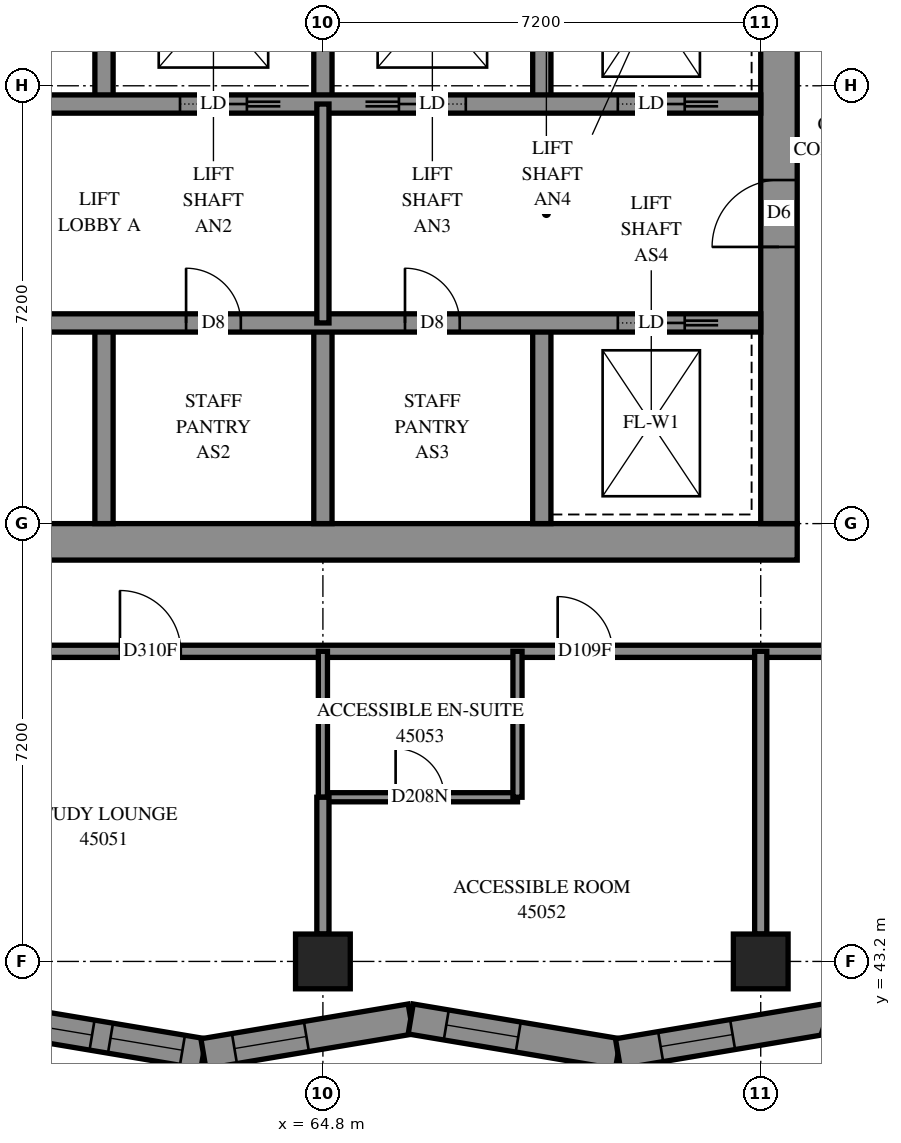
"""IFC4 building model, lengths in metres.
Left out: names, types, materials, properties, quantities, classifications, styles, units other than length and angle.
Written with IfcOpenShell. Run it as: python <this file> out.ifc"""

import sys

from ifc_helpers import new_model, si_unit, direction, frame, frame_2d, origin, origin_2d, place, context, subcontext, project, spatial, polyline, rectangle, outline, extrude, element, fill, save


model = new_model("IFC4")
c1 = context("Model", 3, precision=1e-05, world=origin(), true_north=direction((0.0, 1.0)))
c2 = subcontext(c1, "Body", "Model", "MODEL_VIEW")
j1 = project(units=[si_unit("LENGTHUNIT", "METRE"), si_unit("PLANEANGLEUNIT", "RADIAN")], contexts=[c1])
p1 = place(None, origin())
s1 = spatial("IfcSite", under=j1, at=p1, CompositionType="ELEMENT")
p2 = place(p1, origin())
s2 = spatial("IfcBuilding", under=s1, at=p2, CompositionType="ELEMENT")
p3 = place(p2, frame((0.0, 0.0, 166.0)))
s3 = spatial("IfcBuildingStorey", under=s2, at=p3, CompositionType="ELEMENT", Elevation=166.0)
for number, where, z_axis, x_axis in (
    (1, (64.8, 43.2, 0.0), (0.0, 0.0, 1.0), (1.0, 0.0, 0.0)),
    (2, (72.0, 43.2, 0.0), (0.0, 0.0, 1.0), (1.0, 0.0, 0.0)),
):
    element("IfcColumn", number, at=place(p3, frame(where, z_axis=z_axis, x_axis=x_axis)), inside=s3, PredefinedType="COLUMN", context=c2, shape_type="SweptSolid", body=[
        extrude(rectangle(XDim=0.9, YDim=0.9, at=origin_2d()), origin(), (0.0, 0.0, 1.0), 3.1),
    ])
p4 = place(p3, frame((57.0, 50.1, -0.3), z_axis=(0.0, 0.0, 1.0), x_axis=(1.0, 0.0, 0.0)))
e3 = element("IfcWall", 3, at=p4, inside=s3, PredefinedType="SHEAR", context=c2, shape_type="SweptSolid", body=[
    extrude(rectangle(XDim=15.6, YDim=0.6, at=frame_2d((7.8, 0.0))), origin(), (0.0, 0.0, 1.0), 2.7),
])
p5 = place(p3, frame((72.3, 50.4, -0.3), z_axis=(0.0, 0.0, 1.0), x_axis=(0.0, 1.0, 0.0)))
e4 = element("IfcWall", 4, at=p5, inside=s3, PredefinedType="SHEAR", context=c2, shape_type="SweptSolid", body=[
    extrude(rectangle(XDim=14.4, YDim=0.6, at=frame_2d((7.2, 0.0))), origin(), (0.0, 0.0, 1.0), 2.7),
])
p6 = place(p5, frame((4.55, 0.0, 0.3)))
e5 = element("IfcOpeningElement", 5, at=p6, cuts=e4, PredefinedType="OPENING", context=c2, shape_type="SweptSolid", body=[
    extrude(rectangle(XDim=1.1, YDim=2.1, at=frame_2d((0.55, 1.05))), frame((0.0, 0.31, 0.0), z_axis=(0.0, -1.0, 0.0), x_axis=(1.0, 0.0, 0.0)), (0.0, 0.0, 1.0), 0.62),
])
p7 = place(p5, frame((11.35, 0.0, 0.3)))
e6 = element("IfcOpeningElement", 6, at=p7, cuts=e4, PredefinedType="OPENING", context=c2, shape_type="SweptSolid", body=[
    extrude(rectangle(XDim=1.1, YDim=2.1, at=frame_2d((0.55, 1.05))), frame((0.0, 0.31, 0.0), z_axis=(0.0, -1.0, 0.0), x_axis=(1.0, 0.0, 0.0)), (0.0, 0.0, 1.0), 0.62),
])
for number, where, z_axis, x_axis in (
    (7, (61.2, 50.4, 0.0), (0.0, 0.0, 1.0), (0.0, 1.0, 0.0)),
    (8, (61.2, 57.3, 0.0), (0.0, 0.0, 1.0), (0.0, 1.0, 0.0)),
    (9, (64.8, 50.4, 0.0), (0.0, 0.0, 1.0), (0.0, 1.0, 0.0)),
    (10, (64.8, 57.3, 0.0), (0.0, 0.0, 1.0), (0.0, 1.0, 0.0)),
    (11, (68.4, 50.4, 0.0), (0.0, 0.0, 1.0), (0.0, 1.0, 0.0)),
    (12, (68.4, 57.3, 0.0), (0.0, 0.0, 1.0), (0.0, 1.0, 0.0)),
):
    element("IfcWall", number, at=place(p3, frame(where, z_axis=z_axis, x_axis=x_axis)), inside=s3, PredefinedType="SOLIDWALL", context=c2, shape_type="SweptSolid", body=[
        extrude(rectangle(XDim=3.3, YDim=0.3, at=frame_2d((1.65, 0.0))), origin(), (0.0, 0.0, 1.0), 3.1),
    ])
p8 = place(p3, frame((57.6, 53.7, 0.0), z_axis=(0.0, 0.0, 1.0), x_axis=(1.0, 0.0, 0.0)))
e13 = element("IfcWall", 13, at=p8, inside=s3, PredefinedType="SOLIDWALL", context=c2, shape_type="SweptSolid", body=[
    extrude(rectangle(XDim=14.4, YDim=0.3, at=frame_2d((7.2, 0.0))), origin(), (0.0, 0.0, 1.0), 3.1),
])
p9 = place(p8, frame((1.35, 0.0, 0.0)))
e14 = element("IfcOpeningElement", 14, at=p9, cuts=e13, PredefinedType="OPENING", context=c2, shape_type="SweptSolid", body=[
    extrude(rectangle(XDim=0.9, YDim=2.1, at=frame_2d((0.45, 1.05))), frame((0.0, 0.16, 0.0), z_axis=(0.0, -1.0, 0.0), x_axis=(1.0, 0.0, 0.0)), (0.0, 0.0, 1.0), 0.32),
])
p10 = place(p8, frame((4.95, 0.0, 0.0)))
e15 = element("IfcOpeningElement", 15, at=p10, cuts=e13, PredefinedType="OPENING", context=c2, shape_type="SweptSolid", body=[
    extrude(rectangle(XDim=0.9, YDim=2.1, at=frame_2d((0.45, 1.05))), frame((0.0, 0.16, 0.0), z_axis=(0.0, -1.0, 0.0), x_axis=(1.0, 0.0, 0.0)), (0.0, 0.0, 1.0), 0.32),
])
p11 = place(p8, frame((8.55, 0.0, 0.0)))
e16 = element("IfcOpeningElement", 16, at=p11, cuts=e13, PredefinedType="OPENING", context=c2, shape_type="SweptSolid", body=[
    extrude(rectangle(XDim=0.9, YDim=2.1, at=frame_2d((0.45, 1.05))), frame((0.0, 0.16, 0.0), z_axis=(0.0, -1.0, 0.0), x_axis=(1.0, 0.0, 0.0)), (0.0, 0.0, 1.0), 0.32),
])
p12 = place(p8, frame((12.05, 0.0, 0.0)))
e17 = element("IfcOpeningElement", 17, at=p12, cuts=e13, PredefinedType="OPENING", context=c2, shape_type="SweptSolid", body=[
    extrude(rectangle(XDim=1.1, YDim=2.1, at=frame_2d((0.55, 1.05))), frame((0.0, 0.16, 0.0), z_axis=(0.0, -1.0, 0.0), x_axis=(1.0, 0.0, 0.0)), (0.0, 0.0, 1.0), 0.32),
])
p13 = place(p3, frame((57.6, 57.3, 0.0), z_axis=(0.0, 0.0, 1.0), x_axis=(1.0, 0.0, 0.0)))
e18 = element("IfcWall", 18, at=p13, inside=s3, PredefinedType="SOLIDWALL", context=c2, shape_type="SweptSolid", body=[
    extrude(rectangle(XDim=14.4, YDim=0.3, at=frame_2d((7.2, 0.0))), origin(), (0.0, 0.0, 1.0), 3.1),
])
p14 = place(p13, frame((1.25, 0.0, 0.0)))
e19 = element("IfcOpeningElement", 19, at=p14, cuts=e18, PredefinedType="OPENING", context=c2, shape_type="SweptSolid", body=[
    extrude(rectangle(XDim=1.1, YDim=2.1, at=frame_2d((0.55, 1.05))), frame((0.0, 0.16, 0.0), z_axis=(0.0, -1.0, 0.0), x_axis=(1.0, 0.0, 0.0)), (0.0, 0.0, 1.0), 0.32),
])
p15 = place(p13, frame((4.85, 0.0, 0.0)))
e20 = element("IfcOpeningElement", 20, at=p15, cuts=e18, PredefinedType="OPENING", context=c2, shape_type="SweptSolid", body=[
    extrude(rectangle(XDim=1.1, YDim=2.1, at=frame_2d((0.55, 1.05))), frame((0.0, 0.16, 0.0), z_axis=(0.0, -1.0, 0.0), x_axis=(1.0, 0.0, 0.0)), (0.0, 0.0, 1.0), 0.32),
])
p16 = place(p13, frame((8.45, 0.0, 0.0)))
e21 = element("IfcOpeningElement", 21, at=p16, cuts=e18, PredefinedType="OPENING", context=c2, shape_type="SweptSolid", body=[
    extrude(rectangle(XDim=1.1, YDim=2.1, at=frame_2d((0.55, 1.05))), frame((0.0, 0.16, 0.0), z_axis=(0.0, -1.0, 0.0), x_axis=(1.0, 0.0, 0.0)), (0.0, 0.0, 1.0), 0.32),
])
p17 = place(p13, frame((12.05, 0.0, 0.0)))
e22 = element("IfcOpeningElement", 22, at=p17, cuts=e18, PredefinedType="OPENING", context=c2, shape_type="SweptSolid", body=[
    extrude(rectangle(XDim=1.1, YDim=2.1, at=frame_2d((0.55, 1.05))), frame((0.0, 0.16, 0.0), z_axis=(0.0, -1.0, 0.0), x_axis=(1.0, 0.0, 0.0)), (0.0, 0.0, 1.0), 0.32),
])
p18 = place(p3, frame((59.426, 42.254, 0.0), z_axis=(0.0, 0.0, 1.0), x_axis=(0.9862119159, -0.1654873316, 0.0)))
e23 = element("IfcWall", 23, at=p18, inside=s3, PredefinedType="SOLIDWALL", context=c2, shape_type="SweptSolid", body=[
    extrude(outline(polyline([(0.042, -0.25), (3.498, -0.25), (3.414, 0.25), (-0.042, 0.25), (0.042, -0.25)])), origin(), (0.0, 0.0, 1.0), 3.1),
])
p19 = place(p18, frame((0.399, 0.0, 0.45)))
e24 = element("IfcOpeningElement", 24, at=p19, cuts=e23, PredefinedType="OPENING", context=c2, shape_type="SweptSolid", body=[
    extrude(rectangle(XDim=1.2, YDim=2.5, at=frame_2d((0.6, 1.25))), frame((0.0, 0.26, 0.0), z_axis=(0.0, -1.0, 0.0), x_axis=(1.0, 0.0, 0.0)), (0.0, 0.0, 1.0), 0.52),
])
p20 = place(p18, frame((1.906, 0.0, 0.45)))
e25 = element("IfcOpeningElement", 25, at=p20, cuts=e23, PredefinedType="OPENING", context=c2, shape_type="SweptSolid", body=[
    extrude(rectangle(XDim=1.2, YDim=2.5, at=frame_2d((0.6, 1.25))), frame((0.0, 0.26, 0.0), z_axis=(0.0, -1.0, 0.0), x_axis=(1.0, 0.0, 0.0)), (0.0, 0.0, 1.0), 0.52),
])
p21 = place(p3, frame((62.835, 41.681, 0.0), z_axis=(0.0, 0.0, 1.0), x_axis=(0.9862119159, 0.1654873316, 0.0)))
e26 = element("IfcWall", 26, at=p21, inside=s3, PredefinedType="SOLIDWALL", context=c2, shape_type="SweptSolid", body=[
    extrude(outline(polyline([(-0.042, -0.25), (3.414, -0.25), (3.498, 0.25), (0.042, 0.25), (-0.042, -0.25)])), origin(), (0.0, 0.0, 1.0), 3.1),
])
p22 = place(p21, frame((0.517, 0.0, 0.45)))
e27 = element("IfcOpeningElement", 27, at=p22, cuts=e26, PredefinedType="OPENING", context=c2, shape_type="SweptSolid", body=[
    extrude(rectangle(XDim=1.2, YDim=2.5, at=frame_2d((0.6, 1.25))), frame((0.0, 0.26, 0.0), z_axis=(0.0, -1.0, 0.0), x_axis=(1.0, 0.0, 0.0)), (0.0, 0.0, 1.0), 0.52),
])
p23 = place(p3, frame((66.244, 42.254, 0.0), z_axis=(0.0, 0.0, 1.0), x_axis=(0.9862119159, -0.1654873316, 0.0)))
e28 = element("IfcWall", 28, at=p23, inside=s3, PredefinedType="SOLIDWALL", context=c2, shape_type="SweptSolid", body=[
    extrude(outline(polyline([(0.042, -0.25), (3.498, -0.25), (3.414, 0.25), (-0.042, 0.25), (0.042, -0.25)])), origin(), (0.0, 0.0, 1.0), 3.1),
])
p24 = place(p23, frame((0.593, 0.0, 0.45)))
e29 = element("IfcOpeningElement", 29, at=p24, cuts=e28, PredefinedType="OPENING", context=c2, shape_type="SweptSolid", body=[
    extrude(rectangle(XDim=1.2, YDim=2.5, at=frame_2d((0.6, 1.25))), frame((0.0, 0.26, 0.0), z_axis=(0.0, -1.0, 0.0), x_axis=(1.0, 0.0, 0.0)), (0.0, 0.0, 1.0), 0.52),
])
p25 = place(p3, frame((69.653, 41.681, 0.0), z_axis=(0.0, 0.0, 1.0), x_axis=(0.9862107034, 0.1654945573, 0.0)))
e30 = element("IfcWall", 30, at=p25, inside=s3, PredefinedType="SOLIDWALL", context=c2, shape_type="SweptSolid", body=[
    extrude(outline(polyline([(-0.042, -0.25), (3.414, -0.25), (3.542, 0.25), (0.042, 0.25), (-0.042, -0.25)])), origin(), (0.0, 0.0, 1.0), 3.1),
])
p26 = place(p25, frame((0.711, 0.0, 0.45)))
e31 = element("IfcOpeningElement", 31, at=p26, cuts=e30, PredefinedType="OPENING", context=c2, shape_type="SweptSolid", body=[
    extrude(rectangle(XDim=1.2, YDim=2.5, at=frame_2d((0.6, 1.25))), frame((0.0, 0.26, 0.0), z_axis=(0.0, -1.0, 0.0), x_axis=(1.0, 0.0, 0.0)), (0.0, 0.0, 1.0), 0.52),
])
p27 = place(p3, frame((64.8, 53.7, 0.0), z_axis=(0.0, 0.0, 1.0), x_axis=(0.0, 1.0, 0.0)))
e32 = element("IfcWall", 32, at=p27, inside=s3, PredefinedType="PARTITIONING", context=c2, shape_type="SweptSolid", body=[
    extrude(rectangle(XDim=3.6, YDim=0.2, at=frame_2d((1.8, 0.0))), origin(), (0.0, 0.0, 1.0), 3.1),
])
p28 = place(p3, frame((55.5, 48.3, 0.0), z_axis=(0.0, 0.0, 1.0), x_axis=(1.0, 0.0, 0.0)))
e33 = element("IfcWall", 33, at=p28, inside=s3, PredefinedType="PARTITIONING", context=c2, shape_type="SweptSolid", body=[
    extrude(rectangle(XDim=18.974, YDim=0.2, at=frame_2d((9.487, 0.0))), origin(), (0.0, 0.0, 1.0), 3.1),
])
p29 = place(p28, frame((5.963, 0.0, 0.0)))
e34 = element("IfcOpeningElement", 34, at=p29, cuts=e33, PredefinedType="OPENING", context=c2, shape_type="SweptSolid", body=[
    extrude(rectangle(XDim=1.0, YDim=2.1, at=frame_2d((0.5, 1.05))), frame((0.0, 0.11, 0.0), z_axis=(0.0, -1.0, 0.0), x_axis=(1.0, 0.0, 0.0)), (0.0, 0.0, 1.0), 0.22),
])
p30 = place(p28, frame((13.161, 0.0, 0.0)))
e35 = element("IfcOpeningElement", 35, at=p30, cuts=e33, PredefinedType="OPENING", context=c2, shape_type="SweptSolid", body=[
    extrude(rectangle(XDim=0.9, YDim=2.1, at=frame_2d((0.45, 1.05))), frame((0.0, 0.11, 0.0), z_axis=(0.0, -1.0, 0.0), x_axis=(1.0, 0.0, 0.0)), (0.0, 0.0, 1.0), 0.22),
])
p31 = place(p3, frame((72.0, 43.65, 0.0), z_axis=(0.0, 0.0, 1.0), x_axis=(0.0, 1.0, 0.0)))
e36 = element("IfcWall", 36, at=p31, inside=s3, PredefinedType="PARTITIONING", context=c2, shape_type="SweptSolid", body=[
    extrude(rectangle(XDim=4.65, YDim=0.2, at=frame_2d((2.325, 0.0))), origin(), (0.0, 0.0, 1.0), 3.1),
])
p32 = place(p3, frame((64.8, 45.9, 0.0), z_axis=(0.0, 0.0, 1.0), x_axis=(1.0, 0.0, 0.0)))
e37 = element("IfcWall", 37, at=p32, inside=s3, PredefinedType="PARTITIONING", context=c2, shape_type="SweptSolid", body=[
    extrude(rectangle(XDim=3.2, YDim=0.15, at=frame_2d((1.6, 0.0))), origin(), (0.0, 0.0, 1.0), 3.1),
])
p33 = place(p32, frame((1.196, 0.0, 0.0)))
e38 = element("IfcOpeningElement", 38, at=p33, cuts=e37, PredefinedType="OPENING", context=c2, shape_type="SweptSolid", body=[
    extrude(rectangle(XDim=0.8, YDim=2.1, at=frame_2d((0.4, 1.05))), frame((0.0, 0.085, 0.0), z_axis=(0.0, -1.0, 0.0), x_axis=(1.0, 0.0, 0.0)), (0.0, 0.0, 1.0), 0.17),
])
for number, where, z_axis, x_axis in (
    (39, (68.0, 45.9, 0.0), (0.0, 0.0, 1.0), (0.0, 1.0, 0.0)),
    (40, (64.8, 45.9, 0.0), (0.0, 0.0, 1.0), (0.0, 1.0, 0.0)),
):
    element("IfcWall", number, at=place(p3, frame(where, z_axis=z_axis, x_axis=x_axis)), inside=s3, PredefinedType="PARTITIONING", context=c2, shape_type="SweptSolid", body=[
        extrude(rectangle(XDim=2.4, YDim=0.15, at=frame_2d((1.2, 0.0))), origin(), (0.0, 0.0, 1.0), 3.1),
    ])
p34 = place(p3, frame((64.8, 43.65, 0.0), z_axis=(0.0, 0.0, 1.0), x_axis=(0.0, 1.0, 0.0)))
e41 = element("IfcWall", 41, at=p34, inside=s3, PredefinedType="PARTITIONING", context=c2, shape_type="SweptSolid", body=[
    extrude(rectangle(XDim=2.25, YDim=0.2, at=frame_2d((1.125, 0.0))), origin(), (0.0, 0.0, 1.0), 3.1),
])
p35 = place(p19, origin())
e42 = element("IfcWindow", 42, at=p35, inside=s3, PartitioningType="SINGLE_PANEL", PredefinedType="WINDOW", context=c2, shape_type="SweptSolid", body=[
    extrude(rectangle(XDim=1.2, YDim=2.5, at=frame_2d((0.6, 1.25))), frame((0.0, 0.18, 0.0), z_axis=(0.0, -1.0, 0.0), x_axis=(1.0, 0.0, 0.0)), (0.0, 0.0, 1.0), 0.06),
])
fill(e24, e42)
p36 = place(p20, origin())
e43 = element("IfcWindow", 43, at=p36, inside=s3, PartitioningType="SINGLE_PANEL", PredefinedType="WINDOW", context=c2, shape_type="SweptSolid", body=[
    extrude(rectangle(XDim=1.2, YDim=2.5, at=frame_2d((0.6, 1.25))), frame((0.0, 0.18, 0.0), z_axis=(0.0, -1.0, 0.0), x_axis=(1.0, 0.0, 0.0)), (0.0, 0.0, 1.0), 0.06),
])
fill(e25, e43)
p37 = place(p22, origin())
e44 = element("IfcWindow", 44, at=p37, inside=s3, PartitioningType="SINGLE_PANEL", PredefinedType="WINDOW", context=c2, shape_type="SweptSolid", body=[
    extrude(rectangle(XDim=1.2, YDim=2.5, at=frame_2d((0.6, 1.25))), frame((0.0, 0.18, 0.0), z_axis=(0.0, -1.0, 0.0), x_axis=(1.0, 0.0, 0.0)), (0.0, 0.0, 1.0), 0.06),
])
fill(e27, e44)
p38 = place(p24, origin())
e45 = element("IfcWindow", 45, at=p38, inside=s3, PartitioningType="SINGLE_PANEL", PredefinedType="WINDOW", context=c2, shape_type="SweptSolid", body=[
    extrude(rectangle(XDim=1.2, YDim=2.5, at=frame_2d((0.6, 1.25))), frame((0.0, 0.18, 0.0), z_axis=(0.0, -1.0, 0.0), x_axis=(1.0, 0.0, 0.0)), (0.0, 0.0, 1.0), 0.06),
])
fill(e29, e45)
p39 = place(p26, origin())
e46 = element("IfcWindow", 46, at=p39, inside=s3, PartitioningType="SINGLE_PANEL", PredefinedType="WINDOW", context=c2, shape_type="SweptSolid", body=[
    extrude(rectangle(XDim=1.2, YDim=2.5, at=frame_2d((0.6, 1.25))), frame((0.0, 0.18, 0.0), z_axis=(0.0, -1.0, 0.0), x_axis=(1.0, 0.0, 0.0)), (0.0, 0.0, 1.0), 0.06),
])
fill(e31, e46)
p40 = place(p6, origin())
e47 = element("IfcDoor", 47, at=p40, inside=s3, OperationType="DOUBLE_DOOR_SINGLE_SWING", PredefinedType="DOOR", context=c2, shape_type="SweptSolid", body=[
    extrude(rectangle(XDim=1.1, YDim=2.1, at=frame_2d((0.55, 1.05))), frame((0.0, 0.025, 0.0), z_axis=(0.0, -1.0, 0.0), x_axis=(1.0, 0.0, 0.0)), (0.0, 0.0, 1.0), 0.05),
])
fill(e5, e47)
p41 = place(p10, origin())
e48 = element("IfcDoor", 48, at=p41, inside=s3, OperationType="SINGLE_SWING_LEFT", PredefinedType="DOOR", context=c2, shape_type="SweptSolid", body=[
    extrude(rectangle(XDim=0.9, YDim=2.1, at=frame_2d((0.45, 1.05))), frame((0.0, 0.025, 0.0), z_axis=(0.0, -1.0, 0.0), x_axis=(1.0, 0.0, 0.0)), (0.0, 0.0, 1.0), 0.05),
])
fill(e15, e48)
p42 = place(p11, origin())
e49 = element("IfcDoor", 49, at=p42, inside=s3, OperationType="SINGLE_SWING_LEFT", PredefinedType="DOOR", context=c2, shape_type="SweptSolid", body=[
    extrude(rectangle(XDim=0.9, YDim=2.1, at=frame_2d((0.45, 1.05))), frame((0.0, 0.025, 0.0), z_axis=(0.0, -1.0, 0.0), x_axis=(1.0, 0.0, 0.0)), (0.0, 0.0, 1.0), 0.05),
])
fill(e16, e49)
p43 = place(p12, origin())
e50 = element("IfcDoor", 50, at=p43, inside=s3, OperationType="SLIDING_TO_RIGHT", PredefinedType="DOOR", context=c2, shape_type="SweptSolid", body=[
    extrude(rectangle(XDim=1.1, YDim=2.1, at=frame_2d((0.55, 1.05))), frame((0.0, 0.025, 0.0), z_axis=(0.0, -1.0, 0.0), x_axis=(1.0, 0.0, 0.0)), (0.0, 0.0, 1.0), 0.05),
])
fill(e17, e50)
p44 = place(p15, origin())
e51 = element("IfcDoor", 51, at=p44, inside=s3, OperationType="SLIDING_TO_RIGHT", PredefinedType="DOOR", context=c2, shape_type="SweptSolid", body=[
    extrude(rectangle(XDim=1.1, YDim=2.1, at=frame_2d((0.55, 1.05))), frame((0.0, 0.025, 0.0), z_axis=(0.0, -1.0, 0.0), x_axis=(1.0, 0.0, 0.0)), (0.0, 0.0, 1.0), 0.05),
])
fill(e20, e51)
p45 = place(p16, origin())
e52 = element("IfcDoor", 52, at=p45, inside=s3, OperationType="SLIDING_TO_LEFT", PredefinedType="DOOR", context=c2, shape_type="SweptSolid", body=[
    extrude(rectangle(XDim=1.1, YDim=2.1, at=frame_2d((0.55, 1.05))), frame((0.0, 0.025, 0.0), z_axis=(0.0, -1.0, 0.0), x_axis=(1.0, 0.0, 0.0)), (0.0, 0.0, 1.0), 0.05),
])
fill(e21, e52)
p46 = place(p17, origin())
e53 = element("IfcDoor", 53, at=p46, inside=s3, OperationType="SLIDING_TO_RIGHT", PredefinedType="DOOR", context=c2, shape_type="SweptSolid", body=[
    extrude(rectangle(XDim=1.1, YDim=2.1, at=frame_2d((0.55, 1.05))), frame((0.0, 0.025, 0.0), z_axis=(0.0, -1.0, 0.0), x_axis=(1.0, 0.0, 0.0)), (0.0, 0.0, 1.0), 0.05),
])
fill(e22, e53)
p47 = place(p29, origin())
e54 = element("IfcDoor", 54, at=p47, inside=s3, OperationType="SINGLE_SWING_LEFT", PredefinedType="DOOR", context=c2, shape_type="SweptSolid", body=[
    extrude(rectangle(XDim=1.0, YDim=2.1, at=frame_2d((0.5, 1.05))), frame((0.0, 0.025, 0.0), z_axis=(0.0, -1.0, 0.0), x_axis=(1.0, 0.0, 0.0)), (0.0, 0.0, 1.0), 0.05),
])
fill(e34, e54)
p48 = place(p30, origin())
e55 = element("IfcDoor", 55, at=p48, inside=s3, OperationType="SINGLE_SWING_LEFT", PredefinedType="DOOR", context=c2, shape_type="SweptSolid", body=[
    extrude(rectangle(XDim=0.9, YDim=2.1, at=frame_2d((0.45, 1.05))), frame((0.0, 0.025, 0.0), z_axis=(0.0, -1.0, 0.0), x_axis=(1.0, 0.0, 0.0)), (0.0, 0.0, 1.0), 0.05),
])
fill(e35, e55)
p49 = place(p33, origin())
e56 = element("IfcDoor", 56, at=p49, inside=s3, OperationType="SINGLE_SWING_RIGHT", PredefinedType="DOOR", context=c2, shape_type="SweptSolid", body=[
    extrude(rectangle(XDim=0.8, YDim=2.1, at=frame_2d((0.4, 1.05))), frame((0.0, 0.025, 0.0), z_axis=(0.0, -1.0, 0.0), x_axis=(1.0, 0.0, 0.0)), (0.0, 0.0, 1.0), 0.05),
])
fill(e38, e56)
save(model, sys.argv[1])
